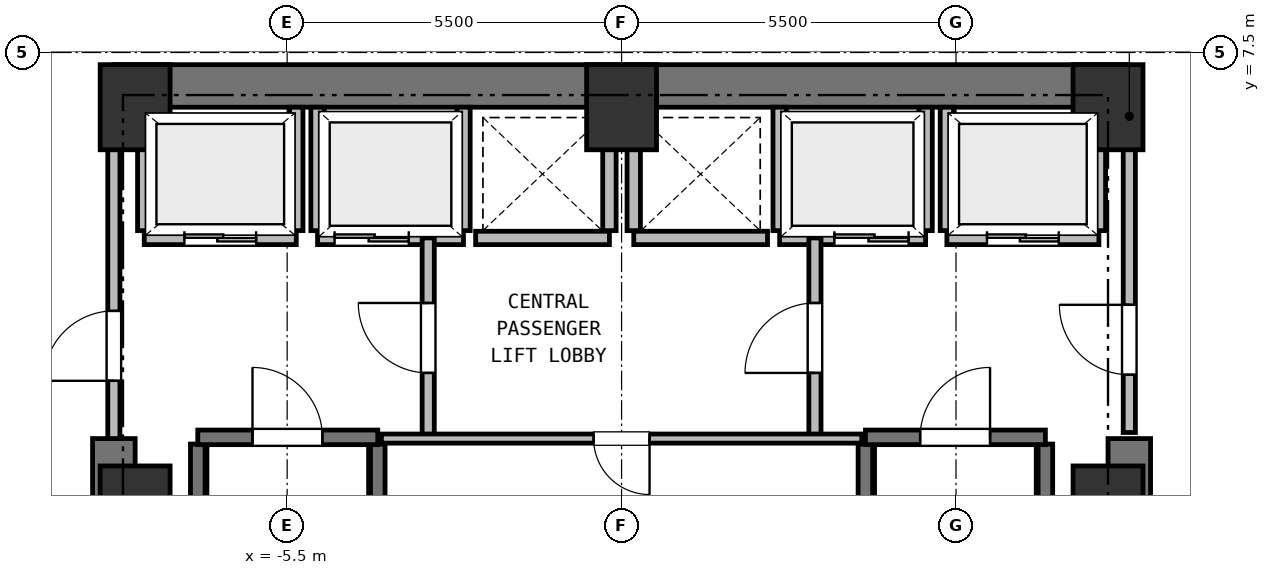
"""IFC4 building model, lengths in metres.
Left out: names, types, materials, properties, quantities, classifications, styles, units other than length and angle.
Written with IfcOpenShell. Run it as: python <this file> out.ifc"""

import sys

from ifc_helpers import new_model, si_unit, direction, frame, frame_2d, origin, origin_2d, place, context, subcontext, project, spatial, rectangle, extrude, element, fill, save


model = new_model("IFC4")
c1 = context("Model", 3, precision=1e-05, world=origin(), true_north=direction((0.0, 1.0)))
c2 = subcontext(c1, "Body", "Model", "MODEL_VIEW")
j1 = project(units=[si_unit("LENGTHUNIT", "METRE"), si_unit("PLANEANGLEUNIT", "RADIAN")], contexts=[c1])
p1 = place(None, origin())
s1 = spatial("IfcSite", under=j1, at=p1, CompositionType="ELEMENT")
p2 = place(p1, origin())
s2 = spatial("IfcBuilding", under=s1, at=p2, CompositionType="ELEMENT")
p3 = place(p2, frame((0.0, 0.0, 26.0)))
s3 = spatial("IfcBuildingStorey", under=s2, at=p3, CompositionType="ELEMENT", Elevation=26.0)
for number, where, z_axis, x_axis in (
    (1, (8.0, 0.0, 0.0), (0.0, 0.0, 1.0), (1.0, 0.0, 0.0)),
    (2, (8.0, 6.6, 0.0), (0.0, 0.0, 1.0), (1.0, 0.0, 0.0)),
    (3, (0.0, 6.6, 0.0), (0.0, 0.0, 1.0), (1.0, 0.0, 0.0)),
    (4, (-8.0, 6.6, 0.0), (0.0, 0.0, 1.0), (1.0, 0.0, 0.0)),
    (5, (-8.0, 0.0, 0.0), (0.0, 0.0, 1.0), (1.0, 0.0, 0.0)),
):
    element("IfcColumn", number, at=place(p3, frame(where, z_axis=z_axis, x_axis=x_axis)), inside=s3, PredefinedType="COLUMN", context=c2, shape_type="SweptSolid", body=[
        extrude(rectangle(XDim=1.15, YDim=1.4, at=origin_2d()), origin(), (0.0, 0.0, 1.0), 4.5),
    ])
p4 = place(p3, frame((-8.35, 6.95, 0.0), z_axis=(0.0, 0.0, 1.0), x_axis=(1.0, 0.0, 0.0)))
e6 = element("IfcWall", 6, at=p4, inside=s3, PredefinedType="SHEAR", context=c2, shape_type="SweptSolid", body=[
    extrude(rectangle(XDim=16.7, YDim=0.7, at=frame_2d((8.35, 0.0))), origin(), (0.0, 0.0, 1.0), 4.25),
])
for number, where, z_axis, x_axis in (
    (7, (-8.35, -6.95, 0.0), (0.0, 0.0, 1.0), (0.0, 1.0, 0.0)),
    (8, (8.35, -6.95, 0.0), (0.0, 0.0, 1.0), (0.0, 1.0, 0.0)),
):
    element("IfcWall", number, at=place(p3, frame(where, z_axis=z_axis, x_axis=x_axis)), inside=s3, PredefinedType="SHEAR", context=c2, shape_type="SweptSolid", body=[
        extrude(rectangle(XDim=8.1, YDim=0.7, at=frame_2d((4.05, 0.0))), origin(), (0.0, 0.0, 1.0), 4.25),
    ])
for number, where, z_axis, x_axis in (
    (9, (-6.97, -6.16, 0.0), (0.0, 0.0, 1.0), (0.0, 1.0, 0.0)),
    (10, (-4.01, -6.16, 0.0), (0.0, 0.0, 1.0), (0.0, 1.0, 0.0)),
):
    element("IfcWall", number, at=place(p3, frame(where, z_axis=z_axis, x_axis=x_axis)), inside=s3, PredefinedType="SHEAR", context=c2, shape_type="SweptSolid", body=[
        extrude(rectangle(XDim=7.22, YDim=0.24, at=frame_2d((3.61, 0.0))), origin(), (0.0, 0.0, 1.0), 4.25),
    ])
p5 = place(p3, frame((-6.97, 1.17, 0.0), z_axis=(0.0, 0.0, 1.0), x_axis=(1.0, 0.0, 0.0)))
e11 = element("IfcWall", 11, at=p5, inside=s3, PredefinedType="SHEAR", context=c2, shape_type="SweptSolid", body=[
    extrude(rectangle(XDim=2.96, YDim=0.24, at=frame_2d((1.48, 0.0))), origin(), (0.0, 0.0, 1.0), 4.25),
])
p6 = place(p5, frame((0.9, 0.0, 0.0)))
e12 = element("IfcOpeningElement", 12, at=p6, cuts=e11, PredefinedType="OPENING", context=c2, shape_type="SweptSolid", body=[
    extrude(rectangle(XDim=1.15, YDim=2.15, at=frame_2d((0.575, 1.075))), frame((0.0, 0.13, 0.0), z_axis=(0.0, -1.0, 0.0), x_axis=(1.0, 0.0, 0.0)), (0.0, 0.0, 1.0), 0.26),
])
for number, where, z_axis, x_axis in (
    (13, (4.01, -6.16, 0.0), (0.0, 0.0, 1.0), (0.0, 1.0, 0.0)),
    (14, (6.97, -6.16, 0.0), (0.0, 0.0, 1.0), (0.0, 1.0, 0.0)),
):
    element("IfcWall", number, at=place(p3, frame(where, z_axis=z_axis, x_axis=x_axis)), inside=s3, PredefinedType="SHEAR", context=c2, shape_type="SweptSolid", body=[
        extrude(rectangle(XDim=7.22, YDim=0.24, at=frame_2d((3.61, 0.0))), origin(), (0.0, 0.0, 1.0), 4.25),
    ])
p7 = place(p3, frame((4.01, 1.17, 0.0), z_axis=(0.0, 0.0, 1.0), x_axis=(1.0, 0.0, 0.0)))
e15 = element("IfcWall", 15, at=p7, inside=s3, PredefinedType="SHEAR", context=c2, shape_type="SweptSolid", body=[
    extrude(rectangle(XDim=2.96, YDim=0.24, at=frame_2d((1.48, 0.0))), origin(), (0.0, 0.0, 1.0), 4.25),
])
p8 = place(p7, frame((0.9, 0.0, 0.0)))
e16 = element("IfcOpeningElement", 16, at=p8, cuts=e15, PredefinedType="OPENING", context=c2, shape_type="SweptSolid", body=[
    extrude(rectangle(XDim=1.15, YDim=2.15, at=frame_2d((0.575, 1.075))), frame((0.0, 0.13, 0.0), z_axis=(0.0, -1.0, 0.0), x_axis=(1.0, 0.0, 0.0)), (0.0, 0.0, 1.0), 0.26),
])
p9 = place(p3, frame((-7.85, 4.45, 0.0), z_axis=(0.0, 0.0, 1.0), x_axis=(1.0, 0.0, 0.0)))
e17 = element("IfcWall", 17, at=p9, inside=s3, PredefinedType="PARTITIONING", context=c2, shape_type="SweptSolid", body=[
    extrude(rectangle(XDim=2.5, YDim=0.22, at=frame_2d((1.25, 0.0))), origin(), (0.0, 0.0, 1.0), 4.25),
])
p10 = place(p9, frame((0.66, 0.0, 0.0)))
e18 = element("IfcOpeningElement", 18, at=p10, cuts=e17, PredefinedType="OPENING", context=c2, shape_type="SweptSolid", body=[
    extrude(rectangle(XDim=1.18, YDim=2.15, at=frame_2d((0.59, 1.075))), frame((0.0, 0.12, 0.0), z_axis=(0.0, -1.0, 0.0), x_axis=(1.0, 0.0, 0.0)), (0.0, 0.0, 1.0), 0.24),
])
p11 = place(p3, frame((-7.85, 4.57, 0.0), z_axis=(0.0, 0.0, 1.0), x_axis=(0.0, 1.0, 0.0)))
e19 = element("IfcWall", 19, at=p11, inside=s3, PredefinedType="PARTITIONING", context=c2, shape_type="SweptSolid", body=[
    extrude(rectangle(XDim=2.03, YDim=0.22, at=frame_2d((1.015, 0.0))), origin(), (0.0, 0.0, 1.0), 3.83),
])
p12 = place(p3, frame((-5.35, 4.57, 0.0), z_axis=(0.0, 0.0, 1.0), x_axis=(0.0, 1.0, 0.0)))
e20 = element("IfcWall", 20, at=p12, inside=s3, PredefinedType="PARTITIONING", context=c2, shape_type="SweptSolid", body=[
    extrude(rectangle(XDim=2.03, YDim=0.22, at=frame_2d((1.015, 0.0))), origin(), (0.0, 0.0, 1.0), 4.25),
])
p13 = place(p3, frame((5.35, 4.45, 0.0), z_axis=(0.0, 0.0, 1.0), x_axis=(1.0, 0.0, 0.0)))
e21 = element("IfcWall", 21, at=p13, inside=s3, PredefinedType="PARTITIONING", context=c2, shape_type="SweptSolid", body=[
    extrude(rectangle(XDim=2.5, YDim=0.22, at=frame_2d((1.25, 0.0))), origin(), (0.0, 0.0, 1.0), 4.25),
])
p14 = place(p13, frame((0.66, 0.0, 0.0)))
e22 = element("IfcOpeningElement", 22, at=p14, cuts=e21, PredefinedType="OPENING", context=c2, shape_type="SweptSolid", body=[
    extrude(rectangle(XDim=1.18, YDim=2.15, at=frame_2d((0.59, 1.075))), frame((0.0, 0.12, 0.0), z_axis=(0.0, -1.0, 0.0), x_axis=(1.0, 0.0, 0.0)), (0.0, 0.0, 1.0), 0.24),
])
p15 = place(p3, frame((5.35, 4.57, 0.0), z_axis=(0.0, 0.0, 1.0), x_axis=(0.0, 1.0, 0.0)))
e23 = element("IfcWall", 23, at=p15, inside=s3, PredefinedType="PARTITIONING", context=c2, shape_type="SweptSolid", body=[
    extrude(rectangle(XDim=2.03, YDim=0.22, at=frame_2d((1.015, 0.0))), origin(), (0.0, 0.0, 1.0), 4.25),
])
p16 = place(p3, frame((7.85, 4.57, 0.0), z_axis=(0.0, 0.0, 1.0), x_axis=(0.0, 1.0, 0.0)))
e24 = element("IfcWall", 24, at=p16, inside=s3, PredefinedType="PARTITIONING", context=c2, shape_type="SweptSolid", body=[
    extrude(rectangle(XDim=2.03, YDim=0.22, at=frame_2d((1.015, 0.0))), origin(), (0.0, 0.0, 1.0), 3.83),
])
p17 = place(p3, frame((-5.0, 4.45, 0.0), z_axis=(0.0, 0.0, 1.0), x_axis=(1.0, 0.0, 0.0)))
e25 = element("IfcWall", 25, at=p17, inside=s3, PredefinedType="PARTITIONING", context=c2, shape_type="SweptSolid", body=[
    extrude(rectangle(XDim=2.4, YDim=0.22, at=frame_2d((1.2, 0.0))), origin(), (0.0, 0.0, 1.0), 4.25),
])
p18 = place(p17, frame((0.28, 0.0, 0.0)))
e26 = element("IfcOpeningElement", 26, at=p18, cuts=e25, PredefinedType="OPENING", context=c2, shape_type="SweptSolid", body=[
    extrude(rectangle(XDim=1.22, YDim=2.15, at=frame_2d((0.61, 1.075))), frame((0.0, 0.12, 0.0), z_axis=(0.0, -1.0, 0.0), x_axis=(1.0, 0.0, 0.0)), (0.0, 0.0, 1.0), 0.24),
])
for number, where, z_axis, x_axis in (
    (27, (-5.0, 4.57, 0.0), (0.0, 0.0, 1.0), (0.0, 1.0, 0.0)),
    (28, (-2.6, 4.57, 0.0), (0.0, 0.0, 1.0), (0.0, 1.0, 0.0)),
):
    element("IfcWall", number, at=place(p3, frame(where, z_axis=z_axis, x_axis=x_axis)), inside=s3, PredefinedType="PARTITIONING", context=c2, shape_type="SweptSolid", body=[
        extrude(rectangle(XDim=2.03, YDim=0.22, at=frame_2d((1.015, 0.0))), origin(), (0.0, 0.0, 1.0), 4.25),
    ])
p19 = place(p3, frame((2.6, 4.45, 0.0), z_axis=(0.0, 0.0, 1.0), x_axis=(1.0, 0.0, 0.0)))
e29 = element("IfcWall", 29, at=p19, inside=s3, PredefinedType="PARTITIONING", context=c2, shape_type="SweptSolid", body=[
    extrude(rectangle(XDim=2.4, YDim=0.22, at=frame_2d((1.2, 0.0))), origin(), (0.0, 0.0, 1.0), 4.25),
])
p20 = place(p19, frame((0.9, 0.0, 0.0)))
e30 = element("IfcOpeningElement", 30, at=p20, cuts=e29, PredefinedType="OPENING", context=c2, shape_type="SweptSolid", body=[
    extrude(rectangle(XDim=1.22, YDim=2.15, at=frame_2d((0.61, 1.075))), frame((0.0, 0.12, 0.0), z_axis=(0.0, -1.0, 0.0), x_axis=(1.0, 0.0, 0.0)), (0.0, 0.0, 1.0), 0.24),
])
for number, where, z_axis, x_axis in (
    (31, (2.6, 4.57, 0.0), (0.0, 0.0, 1.0), (0.0, 1.0, 0.0)),
    (32, (5.0, 4.57, 0.0), (0.0, 0.0, 1.0), (0.0, 1.0, 0.0)),
):
    element("IfcWall", number, at=place(p3, frame(where, z_axis=z_axis, x_axis=x_axis)), inside=s3, PredefinedType="PARTITIONING", context=c2, shape_type="SweptSolid", body=[
        extrude(rectangle(XDim=2.03, YDim=0.22, at=frame_2d((1.015, 0.0))), origin(), (0.0, 0.0, 1.0), 4.25),
    ])
p21 = place(p3, frame((-2.4, 4.45, 0.0), z_axis=(0.0, 0.0, 1.0), x_axis=(1.0, 0.0, 0.0)))
e33 = element("IfcWall", 33, at=p21, inside=s3, PredefinedType="PARTITIONING", context=c2, shape_type="SweptSolid", body=[
    extrude(rectangle(XDim=2.2, YDim=0.22, at=frame_2d((1.1, 0.0))), origin(), (0.0, 0.0, 1.0), 4.25),
])
p22 = place(p3, frame((-0.2, 4.57, 0.0), z_axis=(0.0, 0.0, 1.0), x_axis=(0.0, 1.0, 0.0)))
e34 = element("IfcWall", 34, at=p22, inside=s3, PredefinedType="PARTITIONING", context=c2, shape_type="SweptSolid", body=[
    extrude(rectangle(XDim=2.03, YDim=0.22, at=frame_2d((1.015, 0.0))), origin(), (0.0, 0.0, 1.0), 4.25),
])
p23 = place(p3, frame((0.2, 4.45, 0.0), z_axis=(0.0, 0.0, 1.0), x_axis=(1.0, 0.0, 0.0)))
e35 = element("IfcWall", 35, at=p23, inside=s3, PredefinedType="PARTITIONING", context=c2, shape_type="SweptSolid", body=[
    extrude(rectangle(XDim=2.2, YDim=0.22, at=frame_2d((1.1, 0.0))), origin(), (0.0, 0.0, 1.0), 4.25),
])
p24 = place(p3, frame((0.2, 4.57, 0.0), z_axis=(0.0, 0.0, 1.0), x_axis=(0.0, 1.0, 0.0)))
e36 = element("IfcWall", 36, at=p24, inside=s3, PredefinedType="PARTITIONING", context=c2, shape_type="SweptSolid", body=[
    extrude(rectangle(XDim=2.03, YDim=0.22, at=frame_2d((1.015, 0.0))), origin(), (0.0, 0.0, 1.0), 4.25),
])
p25 = place(p3, frame((-3.18, 1.15, 0.0), z_axis=(0.0, 0.0, 1.0), x_axis=(0.0, 1.0, 0.0)))
e37 = element("IfcWall", 37, at=p25, inside=s3, PredefinedType="PARTITIONING", context=c2, shape_type="SweptSolid", body=[
    extrude(rectangle(XDim=3.3, YDim=0.2, at=frame_2d((1.65, 0.0))), origin(), (0.0, 0.0, 1.0), 4.25),
])
p26 = place(p25, frame((1.08, 0.0, 0.0)))
e38 = element("IfcOpeningElement", 38, at=p26, cuts=e37, PredefinedType="OPENING", context=c2, shape_type="SweptSolid", body=[
    extrude(rectangle(XDim=1.15, YDim=2.15, at=frame_2d((0.575, 1.075))), frame((0.0, 0.11, 0.0), z_axis=(0.0, -1.0, 0.0), x_axis=(1.0, 0.0, 0.0)), (0.0, 0.0, 1.0), 0.22),
])
p27 = place(p3, frame((3.18, 1.15, 0.0), z_axis=(0.0, 0.0, 1.0), x_axis=(0.0, 1.0, 0.0)))
e39 = element("IfcWall", 39, at=p27, inside=s3, PredefinedType="PARTITIONING", context=c2, shape_type="SweptSolid", body=[
    extrude(rectangle(XDim=3.3, YDim=0.2, at=frame_2d((1.65, 0.0))), origin(), (0.0, 0.0, 1.0), 4.25),
])
p28 = place(p27, frame((1.08, 0.0, 0.0)))
e40 = element("IfcOpeningElement", 40, at=p28, cuts=e39, PredefinedType="OPENING", context=c2, shape_type="SweptSolid", body=[
    extrude(rectangle(XDim=1.15, YDim=2.15, at=frame_2d((0.575, 1.075))), frame((0.0, 0.11, 0.0), z_axis=(0.0, -1.0, 0.0), x_axis=(1.0, 0.0, 0.0)), (0.0, 0.0, 1.0), 0.22),
])
p29 = place(p3, frame((-8.35, 1.15, 0.0), z_axis=(0.0, 0.0, 1.0), x_axis=(0.0, 1.0, 0.0)))
e41 = element("IfcWall", 41, at=p29, inside=s3, PredefinedType="PARTITIONING", context=c2, shape_type="SweptSolid", body=[
    extrude(rectangle(XDim=5.4, YDim=0.2, at=frame_2d((2.7, 0.0))), origin(), (0.0, 0.0, 1.0), 4.25),
])
p30 = place(p29, frame((0.95, 0.0, 0.0)))
e42 = element("IfcOpeningElement", 42, at=p30, cuts=e41, PredefinedType="OPENING", context=c2, shape_type="SweptSolid", body=[
    extrude(rectangle(XDim=1.15, YDim=2.15, at=frame_2d((0.575, 1.075))), frame((0.0, 0.11, 0.0), z_axis=(0.0, -1.0, 0.0), x_axis=(1.0, 0.0, 0.0)), (0.0, 0.0, 1.0), 0.22),
])
p31 = place(p3, frame((8.35, 1.25, 0.0), z_axis=(0.0, 0.0, 1.0), x_axis=(0.0, 1.0, 0.0)))
e43 = element("IfcWall", 43, at=p31, inside=s3, PredefinedType="PARTITIONING", context=c2, shape_type="SweptSolid", body=[
    extrude(rectangle(XDim=5.3, YDim=0.2, at=frame_2d((2.65, 0.0))), origin(), (0.0, 0.0, 1.0), 4.25),
])
p32 = place(p31, frame((0.95, 0.0, 0.0)))
e44 = element("IfcOpeningElement", 44, at=p32, cuts=e43, PredefinedType="OPENING", context=c2, shape_type="SweptSolid", body=[
    extrude(rectangle(XDim=1.15, YDim=2.15, at=frame_2d((0.575, 1.075))), frame((0.0, 0.11, 0.0), z_axis=(0.0, -1.0, 0.0), x_axis=(1.0, 0.0, 0.0)), (0.0, 0.0, 1.0), 0.22),
])
p33 = place(p3, frame((3.95, 1.15, 0.0), z_axis=(0.0, 0.0, 1.0), x_axis=(-1.0, 0.0, 0.0)))
e45 = element("IfcWall", 45, at=p33, inside=s3, PredefinedType="PARTITIONING", context=c2, shape_type="SweptSolid", body=[
    extrude(rectangle(XDim=7.9, YDim=0.15, at=frame_2d((3.95, 0.0))), origin(), (0.0, 0.0, 1.0), 4.25),
])
p34 = place(p33, frame((3.49, 0.0, 0.0)))
e46 = element("IfcOpeningElement", 46, at=p34, cuts=e45, PredefinedType="OPENING", context=c2, shape_type="SweptSolid", body=[
    extrude(rectangle(XDim=0.92, YDim=2.05, at=frame_2d((0.46, 1.025))), frame((0.0, 0.085, 0.0), z_axis=(0.0, -1.0, 0.0), x_axis=(1.0, 0.0, 0.0)), (0.0, 0.0, 1.0), 0.17),
])
p35 = place(p6, origin())
e47 = element("IfcDoor", 47, at=p35, inside=s3, OperationType="SINGLE_SWING_LEFT", PredefinedType="DOOR", context=c2, shape_type="SweptSolid", body=[
    extrude(rectangle(XDim=1.15, YDim=2.15, at=frame_2d((0.575, 1.075))), frame((0.0, 0.025, 0.0), z_axis=(0.0, -1.0, 0.0), x_axis=(1.0, 0.0, 0.0)), (0.0, 0.0, 1.0), 0.05),
])
fill(e12, e47)
p36 = place(p8, origin())
e48 = element("IfcDoor", 48, at=p36, inside=s3, OperationType="SINGLE_SWING_RIGHT", PredefinedType="DOOR", context=c2, shape_type="SweptSolid", body=[
    extrude(rectangle(XDim=1.15, YDim=2.15, at=frame_2d((0.575, 1.075))), frame((0.0, 0.025, 0.0), z_axis=(0.0, -1.0, 0.0), x_axis=(1.0, 0.0, 0.0)), (0.0, 0.0, 1.0), 0.05),
])
fill(e16, e48)
p37 = place(p10, origin())
e49 = element("IfcDoor", 49, at=p37, inside=s3, OperationType="DOUBLE_DOOR_SLIDING", PredefinedType="DOOR", context=c2, shape_type="SweptSolid", body=[
    extrude(rectangle(XDim=1.18, YDim=2.15, at=frame_2d((0.59, 1.075))), frame((0.0, 0.025, 0.0), z_axis=(0.0, -1.0, 0.0), x_axis=(1.0, 0.0, 0.0)), (0.0, 0.0, 1.0), 0.05),
])
fill(e18, e49)
p38 = place(p14, origin())
e50 = element("IfcDoor", 50, at=p38, inside=s3, OperationType="DOUBLE_DOOR_SLIDING", PredefinedType="DOOR", context=c2, shape_type="SweptSolid", body=[
    extrude(rectangle(XDim=1.18, YDim=2.15, at=frame_2d((0.59, 1.075))), frame((0.0, 0.025, 0.0), z_axis=(0.0, -1.0, 0.0), x_axis=(1.0, 0.0, 0.0)), (0.0, 0.0, 1.0), 0.05),
])
fill(e22, e50)
p39 = place(p18, origin())
e51 = element("IfcDoor", 51, at=p39, inside=s3, OperationType="DOUBLE_DOOR_SLIDING", PredefinedType="DOOR", context=c2, shape_type="SweptSolid", body=[
    extrude(rectangle(XDim=1.22, YDim=2.15, at=frame_2d((0.61, 1.075))), frame((0.0, 0.025, 0.0), z_axis=(0.0, -1.0, 0.0), x_axis=(1.0, 0.0, 0.0)), (0.0, 0.0, 1.0), 0.05),
])
fill(e26, e51)
p40 = place(p20, origin())
e52 = element("IfcDoor", 52, at=p40, inside=s3, OperationType="DOUBLE_DOOR_SLIDING", PredefinedType="DOOR", context=c2, shape_type="SweptSolid", body=[
    extrude(rectangle(XDim=1.22, YDim=2.15, at=frame_2d((0.61, 1.075))), frame((0.0, 0.025, 0.0), z_axis=(0.0, -1.0, 0.0), x_axis=(1.0, 0.0, 0.0)), (0.0, 0.0, 1.0), 0.05),
])
fill(e30, e52)
p41 = place(p26, origin())
e53 = element("IfcDoor", 53, at=p41, inside=s3, OperationType="SINGLE_SWING_RIGHT", PredefinedType="DOOR", context=c2, shape_type="SweptSolid", body=[
    extrude(rectangle(XDim=1.15, YDim=2.15, at=frame_2d((0.575, 1.075))), frame((0.0, 0.025, 0.0), z_axis=(0.0, -1.0, 0.0), x_axis=(1.0, 0.0, 0.0)), (0.0, 0.0, 1.0), 0.05),
])
fill(e38, e53)
p42 = place(p28, origin())
e54 = element("IfcDoor", 54, at=p42, inside=s3, OperationType="SINGLE_SWING_LEFT", PredefinedType="DOOR", context=c2, shape_type="SweptSolid", body=[
    extrude(rectangle(XDim=1.15, YDim=2.15, at=frame_2d((0.575, 1.075))), frame((0.0, 0.025, 0.0), z_axis=(0.0, -1.0, 0.0), x_axis=(1.0, 0.0, 0.0)), (0.0, 0.0, 1.0), 0.05),
])
fill(e40, e54)
p43 = place(p30, origin())
e55 = element("IfcDoor", 55, at=p43, inside=s3, OperationType="SINGLE_SWING_LEFT", PredefinedType="DOOR", context=c2, shape_type="SweptSolid", body=[
    extrude(rectangle(XDim=1.15, YDim=2.15, at=frame_2d((0.575, 1.075))), frame((0.0, 0.025, 0.0), z_axis=(0.0, -1.0, 0.0), x_axis=(1.0, 0.0, 0.0)), (0.0, 0.0, 1.0), 0.05),
])
fill(e42, e55)
p44 = place(p32, origin())
e56 = element("IfcDoor", 56, at=p44, inside=s3, OperationType="SINGLE_SWING_RIGHT", PredefinedType="DOOR", context=c2, shape_type="SweptSolid", body=[
    extrude(rectangle(XDim=1.15, YDim=2.15, at=frame_2d((0.575, 1.075))), frame((0.0, 0.025, 0.0), z_axis=(0.0, -1.0, 0.0), x_axis=(1.0, 0.0, 0.0)), (0.0, 0.0, 1.0), 0.05),
])
fill(e44, e56)
p45 = place(p34, origin())
e57 = element("IfcDoor", 57, at=p45, inside=s3, OperationType="SINGLE_SWING_LEFT", PredefinedType="DOOR", context=c2, shape_type="SweptSolid", body=[
    extrude(rectangle(XDim=0.92, YDim=2.05, at=frame_2d((0.46, 1.025))), frame((0.0, 0.025, 0.0), z_axis=(0.0, -1.0, 0.0), x_axis=(1.0, 0.0, 0.0)), (0.0, 0.0, 1.0), 0.05),
])
fill(e46, e57)
save(model, sys.argv[1])
